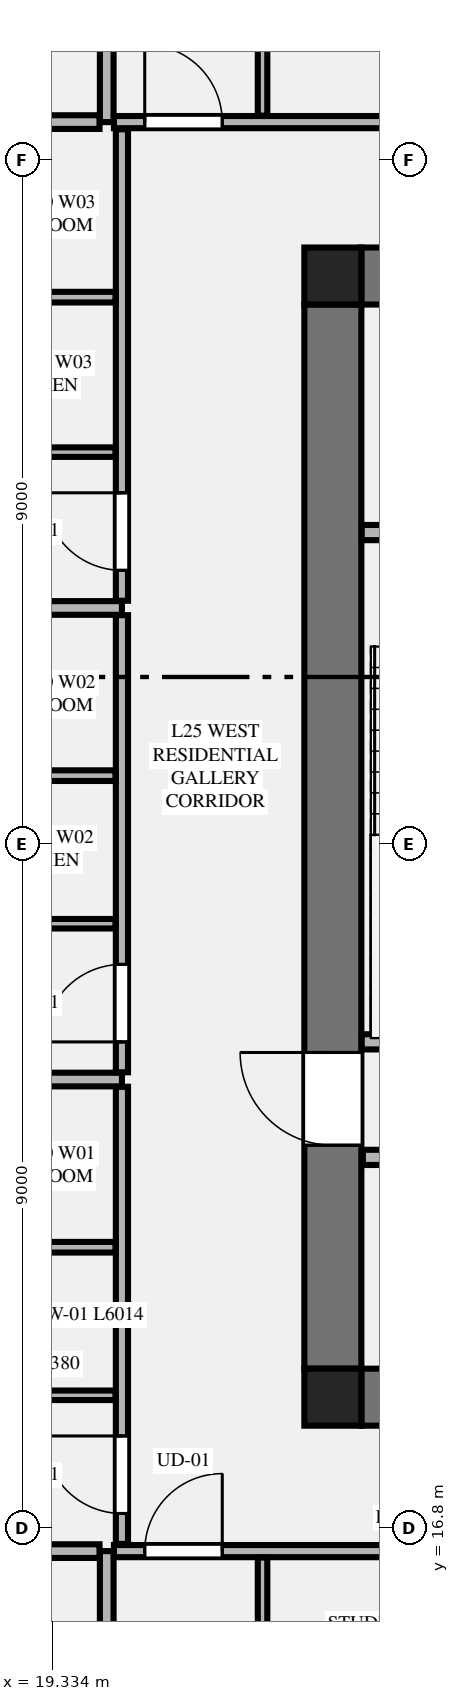
"""IFC4 building model, lengths in metres.
Left out: names, types, materials, properties, quantities, classifications, styles, units other than length and angle.
Written with IfcOpenShell. Run it as: python <this file> out.ifc"""

import sys

from ifc_helpers import new_model, si_unit, direction, frame, frame_2d, origin, origin_2d, place, context, subcontext, project, spatial, rectangle, extrude, element, fill, save


model = new_model("IFC4")
c1 = context("Model", 3, precision=1e-05, world=origin(), true_north=direction((0.0, 1.0)))
c2 = subcontext(c1, "Body", "Model", "MODEL_VIEW")
j1 = project(units=[si_unit("LENGTHUNIT", "METRE"), si_unit("PLANEANGLEUNIT", "RADIAN")], contexts=[c1])
p1 = place(None, origin())
s1 = spatial("IfcSite", under=j1, at=p1, CompositionType="ELEMENT")
p2 = place(p1, origin())
s2 = spatial("IfcBuilding", under=s1, at=p2, CompositionType="ELEMENT")
p3 = place(p2, frame((0.0, 0.0, 98.4)))
s3 = spatial("IfcBuildingStorey", under=s2, at=p3, CompositionType="ELEMENT", Elevation=98.4)
for number, where, z_axis, x_axis in (
    (1, (23.025, 18.525, 0.0), (0.0, 0.0, 1.0), (1.0, 0.0, 0.0)),
    (2, (23.025, 33.275, 0.0), (0.0, 0.0, 1.0), (1.0, 0.0, 0.0)),
):
    element("IfcColumn", number, at=place(p3, frame(where, z_axis=z_axis, x_axis=x_axis)), inside=s3, PredefinedType="COLUMN", context=c2, shape_type="SweptSolid", body=[
        extrude(rectangle(XDim=0.75, YDim=0.75, at=origin_2d()), origin(), (0.0, 0.0, 1.0), 3.55),
    ])
for number, where, z_axis, x_axis in (
    (3, (23.4, 18.525, 0.0), (0.0, 0.0, 1.0), (1.0, 0.0, 0.0)),
    (4, (23.4, 33.275, 0.0), (0.0, 0.0, 1.0), (1.0, 0.0, 0.0)),
):
    element("IfcWall", number, at=place(p3, frame(where, z_axis=z_axis, x_axis=x_axis)), inside=s3, PredefinedType="SHEAR", context=c2, shape_type="SweptSolid", body=[
        extrude(rectangle(XDim=18.0, YDim=0.75, at=frame_2d((9.0, 0.0))), origin(), (0.0, 0.0, 1.0), 3.34),
    ])
p4 = place(p3, frame((23.025, 18.9, 0.0), z_axis=(0.0, 0.0, 1.0), x_axis=(0.0, 1.0, 0.0)))
e5 = element("IfcWall", 5, at=p4, inside=s3, PredefinedType="SHEAR", context=c2, shape_type="SweptSolid", body=[
    extrude(rectangle(XDim=14.0, YDim=0.75, at=frame_2d((7.0, 0.0))), origin(), (0.0, 0.0, 1.0), 3.34),
])
p5 = place(p4, frame((2.94, 0.0, 0.0)))
e6 = element("IfcOpeningElement", 6, at=p5, cuts=e5, PredefinedType="OPENING", context=c2, shape_type="SweptSolid", body=[
    extrude(rectangle(XDim=1.22, YDim=2.25, at=frame_2d((0.61, 1.125))), frame((0.0, 0.385, 0.0), z_axis=(0.0, -1.0, 0.0), x_axis=(1.0, 0.0, 0.0)), (0.0, 0.0, 1.0), 0.77),
])
p6 = place(p3, frame((23.405, 23.2, 0.0), z_axis=(0.0, 0.0, 1.0), x_axis=(1.0, 0.0, 0.0)))
e7 = element("IfcWall", 7, at=p6, inside=s3, PredefinedType="PLUMBINGWALL", context=c2, shape_type="SweptSolid", body=[
    extrude(rectangle(XDim=3.27, YDim=0.2, at=frame_2d((1.635, 0.0))), origin(), (0.0, 0.0, 1.0), 3.34),
])
p7 = place(p3, frame((23.405, 29.9, 0.0), z_axis=(0.0, 0.0, 1.0), x_axis=(1.0, 0.0, 0.0)))
e8 = element("IfcWall", 8, at=p7, inside=s3, PredefinedType="PLUMBINGWALL", context=c2, shape_type="SweptSolid", body=[
    extrude(rectangle(XDim=3.27, YDim=0.2, at=frame_2d((1.635, 0.0))), origin(), (0.0, 0.0, 1.0), 3.34),
])
p8 = place(p7, frame((1.85, 0.0, 0.0)))
e9 = element("IfcOpeningElement", 9, at=p8, cuts=e8, PredefinedType="OPENING", context=c2, shape_type="SweptSolid", body=[
    extrude(rectangle(XDim=0.85, YDim=2.05, at=frame_2d((0.425, 1.025))), frame((0.0, 0.11, 0.0), z_axis=(0.0, -1.0, 0.0), x_axis=(1.0, 0.0, 0.0)), (0.0, 0.0, 1.0), 0.22),
])
p9 = place(p3, frame((23.42, 21.68, 0.0), z_axis=(0.0, 0.0, 1.0), x_axis=(1.0, 0.0, 0.0)))
e10 = element("IfcWall", 10, at=p9, inside=s3, PredefinedType="PLUMBINGWALL", context=c2, shape_type="SweptSolid", body=[
    extrude(rectangle(XDim=17.96, YDim=0.2, at=frame_2d((8.98, 0.0))), origin(), (0.0, 0.0, 1.0), 3.34),
])
p10 = place(p9, frame((11.6, 0.0, 0.0)))
e11 = element("IfcOpeningElement", 11, at=p10, cuts=e10, PredefinedType="OPENING", context=c2, shape_type="SweptSolid", body=[
    extrude(rectangle(XDim=1.1, YDim=2.2, at=frame_2d((0.55, 1.1))), frame((0.0, 0.11, 0.0), z_axis=(0.0, -1.0, 0.0), x_axis=(1.0, 0.0, 0.0)), (0.0, 0.0, 1.0), 0.22),
])
p11 = place(p9, frame((1.2, 0.0, 0.0)))
e12 = element("IfcOpeningElement", 12, at=p11, cuts=e10, PredefinedType="OPENING", context=c2, shape_type="SweptSolid", body=[
    extrude(rectangle(XDim=0.85, YDim=2.05, at=frame_2d((0.425, 1.025))), frame((0.0, 0.11, 0.0), z_axis=(0.0, -1.0, 0.0), x_axis=(1.0, 0.0, 0.0)), (0.0, 0.0, 1.0), 0.22),
])
p12 = place(p9, frame((13.55, 0.0, 0.0)))
e13 = element("IfcOpeningElement", 13, at=p12, cuts=e10, PredefinedType="OPENING", context=c2, shape_type="SweptSolid", body=[
    extrude(rectangle(XDim=0.85, YDim=2.05, at=frame_2d((0.425, 1.025))), frame((0.0, 0.11, 0.0), z_axis=(0.0, -1.0, 0.0), x_axis=(1.0, 0.0, 0.0)), (0.0, 0.0, 1.0), 0.22),
])
p13 = place(p9, frame((15.85, 0.0, 0.0)))
e14 = element("IfcOpeningElement", 14, at=p13, cuts=e10, PredefinedType="OPENING", context=c2, shape_type="SweptSolid", body=[
    extrude(rectangle(XDim=0.85, YDim=2.05, at=frame_2d((0.425, 1.025))), frame((0.0, 0.11, 0.0), z_axis=(0.0, -1.0, 0.0), x_axis=(1.0, 0.0, 0.0)), (0.0, 0.0, 1.0), 0.22),
])
p14 = place(p3, frame((20.05, 4.105, 0.0), z_axis=(0.0, 0.0, 1.0), x_axis=(0.0, 1.0, 0.0)))
e15 = element("IfcWall", 15, at=p14, inside=s3, PredefinedType="PARTITIONING", context=c2, shape_type="SweptSolid", body=[
    extrude(rectangle(XDim=12.395, YDim=0.18, at=frame_2d((6.198, 0.0))), origin(), (0.0, 0.0, 1.0), 3.34),
])
p15 = place(p3, frame((20.145, 16.5, 0.0), z_axis=(0.0, 0.0, 1.0), x_axis=(1.0, 0.0, 0.0)))
e16 = element("IfcWall", 16, at=p15, inside=s3, PredefinedType="PARTITIONING", context=c2, shape_type="SweptSolid", body=[
    extrude(rectangle(XDim=8.328, YDim=0.16, at=frame_2d((4.164, 0.0))), origin(), (0.0, 0.0, 1.0), 3.34),
])
p16 = place(p15, frame((0.405, 0.0, 0.0)))
e17 = element("IfcOpeningElement", 17, at=p16, cuts=e16, PredefinedType="OPENING", context=c2, shape_type="SweptSolid", body=[
    extrude(rectangle(XDim=1.02, YDim=2.25, at=frame_2d((0.51, 1.125))), frame((0.0, 0.09, 0.0), z_axis=(0.0, -1.0, 0.0), x_axis=(1.0, 0.0, 0.0)), (0.0, 0.0, 1.0), 0.18),
])
p17 = place(p3, frame((22.1, 13.01, 0.0), z_axis=(0.0, 0.0, 1.0), x_axis=(0.0, 1.0, 0.0)))
e18 = element("IfcWall", 18, at=p17, inside=s3, PredefinedType="PARTITIONING", context=c2, shape_type="SweptSolid", body=[
    extrude(rectangle(XDim=3.405, YDim=0.125, at=frame_2d((1.703, 0.0))), origin(), (0.0, 0.0, 1.0), 2.722),
])
p18 = place(p3, frame((20.05, 35.3, 0.0), z_axis=(0.0, 0.0, 1.0), x_axis=(0.0, 1.0, 0.0)))
e19 = element("IfcWall", 19, at=p18, inside=s3, PredefinedType="PARTITIONING", context=c2, shape_type="SweptSolid", body=[
    extrude(rectangle(XDim=12.195, YDim=0.18, at=frame_2d((6.098, 0.0))), origin(), (0.0, 0.0, 1.0), 3.34),
])
p19 = place(p3, frame((20.145, 35.3, 0.0), z_axis=(0.0, 0.0, 1.0), x_axis=(1.0, 0.0, 0.0)))
e20 = element("IfcWall", 20, at=p19, inside=s3, PredefinedType="PARTITIONING", context=c2, shape_type="SweptSolid", body=[
    extrude(rectangle(XDim=15.992, YDim=0.16, at=frame_2d((7.996, 0.0))), origin(), (0.0, 0.0, 1.0), 3.34),
])
p20 = place(p19, frame((0.405, 0.0, 0.0)))
e21 = element("IfcOpeningElement", 21, at=p20, cuts=e20, PredefinedType="OPENING", context=c2, shape_type="SweptSolid", body=[
    extrude(rectangle(XDim=1.02, YDim=2.25, at=frame_2d((0.51, 1.125))), frame((0.0, 0.09, 0.0), z_axis=(0.0, -1.0, 0.0), x_axis=(1.0, 0.0, 0.0)), (0.0, 0.0, 1.0), 0.18),
])
p21 = place(p3, frame((22.1, 35.385, 0.0), z_axis=(0.0, 0.0, 1.0), x_axis=(0.0, 1.0, 0.0)))
e22 = element("IfcWall", 22, at=p21, inside=s3, PredefinedType="PARTITIONING", context=c2, shape_type="SweptSolid", body=[
    extrude(rectangle(XDim=3.59, YDim=0.125, at=frame_2d((1.795, 0.0))), origin(), (0.0, 0.0, 1.0), 2.722),
])
p22 = place(p3, frame((12.185, 16.5, 0.0), z_axis=(0.0, 0.0, 1.0), x_axis=(1.0, 0.0, 0.0)))
e23 = element("IfcWall", 23, at=p22, inside=s3, PredefinedType="PARTITIONING", context=c2, shape_type="SweptSolid", body=[
    extrude(rectangle(XDim=7.77, YDim=0.18, at=frame_2d((3.885, 0.0))), origin(), (0.0, 0.0, 1.0), 3.34),
])
p23 = place(p3, frame((12.286, 35.3, 0.0), z_axis=(0.0, 0.0, 1.0), x_axis=(1.0, 0.0, 0.0)))
e24 = element("IfcWall", 24, at=p23, inside=s3, PredefinedType="PARTITIONING", context=c2, shape_type="SweptSolid", body=[
    extrude(rectangle(XDim=7.669, YDim=0.18, at=frame_2d((3.834, 0.0))), origin(), (0.0, 0.0, 1.0), 3.34),
])
p24 = place(p3, frame((20.25, 16.595, 0.0), z_axis=(0.0, 0.0, 1.0), x_axis=(0.0, 1.0, 0.0)))
e25 = element("IfcWall", 25, at=p24, inside=s3, PredefinedType="PARTITIONING", context=c2, shape_type="SweptSolid", body=[
    extrude(rectangle(XDim=6.014, YDim=0.16, at=frame_2d((3.007, 0.0))), origin(), (0.0, 0.0, 1.0), 3.34),
])
p25 = place(p24, frame((0.4, 0.0, 0.0)))
e26 = element("IfcOpeningElement", 26, at=p25, cuts=e25, PredefinedType="OPENING", context=c2, shape_type="SweptSolid", body=[
    extrude(rectangle(XDim=1.02, YDim=2.25, at=frame_2d((0.51, 1.125))), frame((0.0, 0.09, 0.0), z_axis=(0.0, -1.0, 0.0), x_axis=(1.0, 0.0, 0.0)), (0.0, 0.0, 1.0), 0.18),
])
p26 = place(p3, frame((17.785, 18.55, 0.0), z_axis=(0.0, 0.0, 1.0), x_axis=(1.0, 0.0, 0.0)))
e27 = element("IfcWall", 27, at=p26, inside=s3, PredefinedType="PARTITIONING", context=c2, shape_type="SweptSolid", body=[
    extrude(rectangle(XDim=2.38, YDim=0.125, at=frame_2d((1.19, 0.0))), origin(), (0.0, 0.0, 1.0), 2.722),
])
p27 = place(p3, frame((17.785, 20.498, 0.0), z_axis=(0.0, 0.0, 1.0), x_axis=(1.0, 0.0, 0.0)))
e28 = element("IfcWall", 28, at=p27, inside=s3, PredefinedType="PLUMBINGWALL", context=c2, shape_type="SweptSolid", body=[
    extrude(rectangle(XDim=2.38, YDim=0.14, at=frame_2d((1.19, 0.0))), origin(), (0.0, 0.0, 1.0), 3.34),
])
p28 = place(p3, frame((9.046, 22.704, 0.0), z_axis=(0.0, 0.0, 1.0), x_axis=(1.0, 0.0, 0.0)))
e29 = element("IfcWall", 29, at=p28, inside=s3, PredefinedType="PARTITIONING", context=c2, shape_type="SweptSolid", body=[
    extrude(rectangle(XDim=11.204, YDim=0.18, at=frame_2d((5.602, 0.0))), origin(), (0.0, 0.0, 1.0), 3.34),
])
p29 = place(p3, frame((20.25, 22.799, 0.0), z_axis=(0.0, 0.0, 1.0), x_axis=(0.0, 1.0, 0.0)))
e30 = element("IfcWall", 30, at=p29, inside=s3, PredefinedType="PARTITIONING", context=c2, shape_type="SweptSolid", body=[
    extrude(rectangle(XDim=6.014, YDim=0.16, at=frame_2d((3.007, 0.0))), origin(), (0.0, 0.0, 1.0), 3.34),
])
p30 = place(p29, frame((0.4, 0.0, 0.0)))
e31 = element("IfcOpeningElement", 31, at=p30, cuts=e30, PredefinedType="OPENING", context=c2, shape_type="SweptSolid", body=[
    extrude(rectangle(XDim=1.02, YDim=2.25, at=frame_2d((0.51, 1.125))), frame((0.0, 0.09, 0.0), z_axis=(0.0, -1.0, 0.0), x_axis=(1.0, 0.0, 0.0)), (0.0, 0.0, 1.0), 0.18),
])
p31 = place(p3, frame((17.785, 24.754, 0.0), z_axis=(0.0, 0.0, 1.0), x_axis=(1.0, 0.0, 0.0)))
e32 = element("IfcWall", 32, at=p31, inside=s3, PredefinedType="PARTITIONING", context=c2, shape_type="SweptSolid", body=[
    extrude(rectangle(XDim=2.38, YDim=0.125, at=frame_2d((1.19, 0.0))), origin(), (0.0, 0.0, 1.0), 3.34),
])
p32 = place(p3, frame((17.785, 26.702, 0.0), z_axis=(0.0, 0.0, 1.0), x_axis=(1.0, 0.0, 0.0)))
e33 = element("IfcWall", 33, at=p32, inside=s3, PredefinedType="PLUMBINGWALL", context=c2, shape_type="SweptSolid", body=[
    extrude(rectangle(XDim=2.38, YDim=0.14, at=frame_2d((1.19, 0.0))), origin(), (0.0, 0.0, 1.0), 3.34),
])
p33 = place(p3, frame((9.052, 28.908, 0.0), z_axis=(0.0, 0.0, 1.0), x_axis=(1.0, 0.0, 0.0)))
e34 = element("IfcWall", 34, at=p33, inside=s3, PredefinedType="PARTITIONING", context=c2, shape_type="SweptSolid", body=[
    extrude(rectangle(XDim=11.198, YDim=0.18, at=frame_2d((5.599, 0.0))), origin(), (0.0, 0.0, 1.0), 3.34),
])
p34 = place(p3, frame((20.25, 29.003, 0.0), z_axis=(0.0, 0.0, 1.0), x_axis=(0.0, 1.0, 0.0)))
e35 = element("IfcWall", 35, at=p34, inside=s3, PredefinedType="PARTITIONING", context=c2, shape_type="SweptSolid", body=[
    extrude(rectangle(XDim=6.202, YDim=0.16, at=frame_2d((3.101, 0.0))), origin(), (0.0, 0.0, 1.0), 3.34),
])
p35 = place(p34, frame((0.4, 0.0, 0.0)))
e36 = element("IfcOpeningElement", 36, at=p35, cuts=e35, PredefinedType="OPENING", context=c2, shape_type="SweptSolid", body=[
    extrude(rectangle(XDim=1.02, YDim=2.25, at=frame_2d((0.51, 1.125))), frame((0.0, 0.09, 0.0), z_axis=(0.0, -1.0, 0.0), x_axis=(1.0, 0.0, 0.0)), (0.0, 0.0, 1.0), 0.18),
])
p36 = place(p3, frame((17.785, 30.958, 0.0), z_axis=(0.0, 0.0, 1.0), x_axis=(1.0, 0.0, 0.0)))
e37 = element("IfcWall", 37, at=p36, inside=s3, PredefinedType="PARTITIONING", context=c2, shape_type="SweptSolid", body=[
    extrude(rectangle(XDim=2.38, YDim=0.125, at=frame_2d((1.19, 0.0))), origin(), (0.0, 0.0, 1.0), 3.34),
])
p37 = place(p3, frame((17.785, 32.997, 0.0), z_axis=(0.0, 0.0, 1.0), x_axis=(1.0, 0.0, 0.0)))
e38 = element("IfcWall", 38, at=p37, inside=s3, PredefinedType="PLUMBINGWALL", context=c2, shape_type="SweptSolid", body=[
    extrude(rectangle(XDim=2.38, YDim=0.14, at=frame_2d((1.19, 0.0))), origin(), (0.0, 0.0, 1.0), 3.34),
])
p38 = place(p5, origin())
e39 = element("IfcDoor", 39, at=p38, inside=s3, OperationType="SINGLE_SWING_RIGHT", PredefinedType="DOOR", context=c2, shape_type="SweptSolid", body=[
    extrude(rectangle(XDim=1.22, YDim=2.25, at=frame_2d((0.61, 1.125))), frame((0.0, 0.025, 0.0), z_axis=(0.0, -1.0, 0.0), x_axis=(1.0, 0.0, 0.0)), (0.0, 0.0, 1.0), 0.05),
])
fill(e6, e39)
p39 = place(p16, origin())
e40 = element("IfcDoor", 40, at=p39, inside=s3, OperationType="SINGLE_SWING_RIGHT", PredefinedType="DOOR", context=c2, shape_type="SweptSolid", body=[
    extrude(rectangle(XDim=1.02, YDim=2.25, at=frame_2d((0.51, 1.125))), frame((0.0, 0.025, 0.0), z_axis=(0.0, -1.0, 0.0), x_axis=(1.0, 0.0, 0.0)), (0.0, 0.0, 1.0), 0.05),
])
fill(e17, e40)
p40 = place(p20, origin())
e41 = element("IfcDoor", 41, at=p40, inside=s3, OperationType="SINGLE_SWING_LEFT", PredefinedType="DOOR", context=c2, shape_type="SweptSolid", body=[
    extrude(rectangle(XDim=1.02, YDim=2.25, at=frame_2d((0.51, 1.125))), frame((0.0, 0.025, 0.0), z_axis=(0.0, -1.0, 0.0), x_axis=(1.0, 0.0, 0.0)), (0.0, 0.0, 1.0), 0.05),
])
fill(e21, e41)
p41 = place(p25, origin())
e42 = element("IfcDoor", 42, at=p41, inside=s3, OperationType="SINGLE_SWING_RIGHT", PredefinedType="DOOR", context=c2, shape_type="SweptSolid", body=[
    extrude(rectangle(XDim=1.02, YDim=2.25, at=frame_2d((0.51, 1.125))), frame((0.0, 0.025, 0.0), z_axis=(0.0, -1.0, 0.0), x_axis=(1.0, 0.0, 0.0)), (0.0, 0.0, 1.0), 0.05),
])
fill(e26, e42)
p42 = place(p30, origin())
e43 = element("IfcDoor", 43, at=p42, inside=s3, OperationType="SINGLE_SWING_LEFT", PredefinedType="DOOR", context=c2, shape_type="SweptSolid", body=[
    extrude(rectangle(XDim=1.02, YDim=2.25, at=frame_2d((0.51, 1.125))), frame((0.0, 0.025, 0.0), z_axis=(0.0, -1.0, 0.0), x_axis=(1.0, 0.0, 0.0)), (0.0, 0.0, 1.0), 0.05),
])
fill(e31, e43)
p43 = place(p35, origin())
e44 = element("IfcDoor", 44, at=p43, inside=s3, OperationType="SINGLE_SWING_RIGHT", PredefinedType="DOOR", context=c2, shape_type="SweptSolid", body=[
    extrude(rectangle(XDim=1.02, YDim=2.25, at=frame_2d((0.51, 1.125))), frame((0.0, 0.025, 0.0), z_axis=(0.0, -1.0, 0.0), x_axis=(1.0, 0.0, 0.0)), (0.0, 0.0, 1.0), 0.05),
])
fill(e36, e44)
save(model, sys.argv[1])
